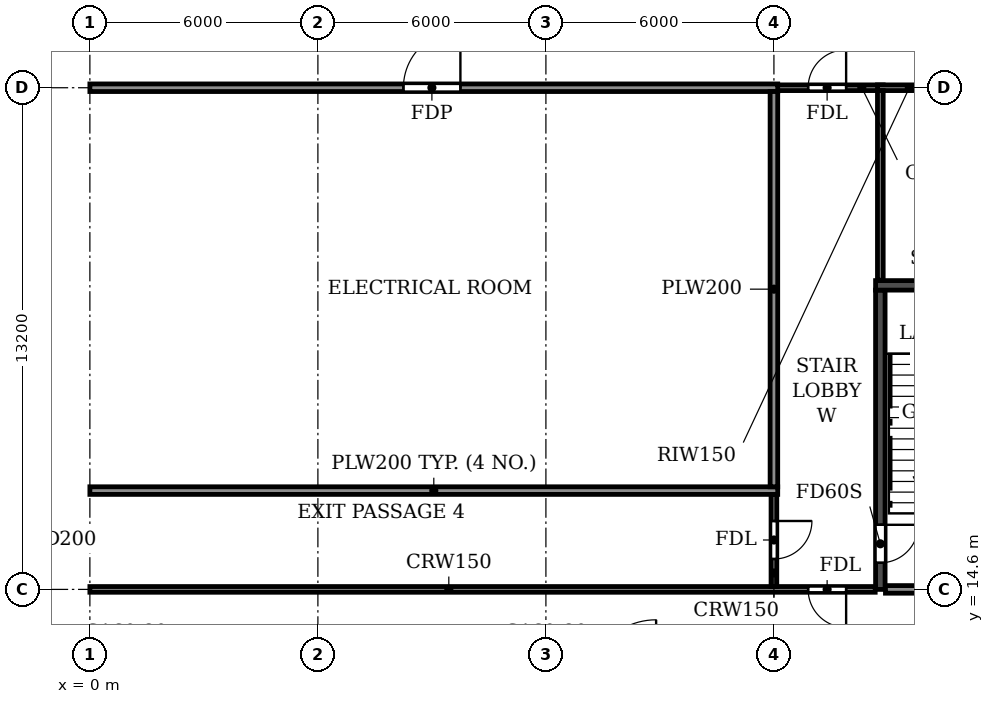
"""IFC4 building model, lengths in metres.
Left out: names, types, materials, properties, quantities, classifications, styles, units other than length and angle.
Written with IfcOpenShell. Run it as: python <this file> out.ifc"""

import sys

from ifc_helpers import new_model, si_unit, direction, frame, frame_2d, origin, place, context, subcontext, project, spatial, rectangle, extrude, element, fill, save


model = new_model("IFC4")
c1 = context("Model", 3, precision=1e-05, world=origin(), true_north=direction((0.0, 1.0)))
c2 = subcontext(c1, "Body", "Model", "MODEL_VIEW")
j1 = project(units=[si_unit("LENGTHUNIT", "METRE"), si_unit("PLANEANGLEUNIT", "RADIAN")], contexts=[c1])
p1 = place(None, origin())
s1 = spatial("IfcSite", under=j1, at=p1, CompositionType="ELEMENT")
p2 = place(p1, origin())
s2 = spatial("IfcBuilding", under=s1, at=p2, CompositionType="ELEMENT")
p3 = place(p2, origin())
s3 = spatial("IfcBuildingStorey", under=s2, at=p3, CompositionType="ELEMENT", Elevation=0.0)
p4 = place(p3, frame((20.8, 14.6, 0.0), z_axis=(0.0, 0.0, 1.0), x_axis=(0.0, 1.0, 0.0)))
e1 = element("IfcWall", 1, at=p4, inside=s3, PredefinedType="SOLIDWALL", context=c2, shape_type="SweptSolid", body=[
    extrude(rectangle(XDim=7.875, YDim=0.25, at=frame_2d((3.938, 0.0))), origin(), (0.0, 0.0, 1.0), 4.2),
])
p5 = place(p4, frame((0.7, 0.0, 0.0)))
e2 = element("IfcOpeningElement", 2, at=p5, cuts=e1, PredefinedType="OPENING", context=c2, shape_type="SweptSolid", body=[
    extrude(rectangle(XDim=1.0, YDim=2.1, at=frame_2d((0.5, 1.05))), frame((0.0, 0.135, 0.0), z_axis=(0.0, -1.0, 0.0), x_axis=(1.0, 0.0, 0.0)), (0.0, 0.0, 1.0), 0.27),
])
p6 = place(p3, frame((20.675, 22.6, 0.0), z_axis=(0.0, 0.0, 1.0), x_axis=(1.0, 0.0, 0.0)))
e3 = element("IfcWall", 3, at=p6, inside=s3, PredefinedType="SOLIDWALL", context=c2, shape_type="SweptSolid", body=[
    extrude(rectangle(XDim=4.05, YDim=0.25, at=frame_2d((2.025, 0.0))), origin(), (0.0, 0.0, 1.0), 4.2),
])
p7 = place(p3, frame((0.0, 14.6, 0.0), z_axis=(0.0, 0.0, 1.0), x_axis=(1.0, 0.0, 0.0)))
e4 = element("IfcWall", 4, at=p7, inside=s3, PredefinedType="PARTITIONING", context=c2, shape_type="SweptSolid", body=[
    extrude(rectangle(XDim=20.665, YDim=0.15, at=frame_2d((10.333, 0.0))), origin(), (0.0, 0.0, 1.0), 4.2),
])
p8 = place(p7, frame((18.9, 0.0, 0.0)))
e5 = element("IfcOpeningElement", 5, at=p8, cuts=e4, PredefinedType="OPENING", context=c2, shape_type="SweptSolid", body=[
    extrude(rectangle(XDim=1.0, YDim=2.1, at=frame_2d((0.5, 1.05))), frame((0.0, 0.085, 0.0), z_axis=(0.0, -1.0, 0.0), x_axis=(1.0, 0.0, 0.0)), (0.0, 0.0, 1.0), 0.17),
])
p9 = place(p3, frame((17.9, 27.8, 0.0), z_axis=(0.0, 0.0, 1.0), x_axis=(1.0, 0.0, 0.0)))
e6 = element("IfcWall", 6, at=p9, inside=s3, PredefinedType="PARTITIONING", context=c2, shape_type="SweptSolid", body=[
    extrude(rectangle(XDim=2.975, YDim=0.15, at=frame_2d((1.488, 0.0))), origin(), (0.0, 0.0, 1.0), 4.2),
])
p10 = place(p9, frame((1.0, 0.0, 0.0)))
e7 = element("IfcOpeningElement", 7, at=p10, cuts=e6, PredefinedType="OPENING", context=c2, shape_type="SweptSolid", body=[
    extrude(rectangle(XDim=1.0, YDim=2.1, at=frame_2d((0.5, 1.05))), frame((0.0, 0.085, 0.0), z_axis=(0.0, -1.0, 0.0), x_axis=(1.0, 0.0, 0.0)), (0.0, 0.0, 1.0), 0.17),
])
p11 = place(p3, frame((18.0, 14.675, 0.0), z_axis=(0.0, 0.0, 1.0), x_axis=(0.0, 1.0, 0.0)))
e8 = element("IfcWall", 8, at=p11, inside=s3, PredefinedType="PARTITIONING", context=c2, shape_type="SweptSolid", body=[
    extrude(rectangle(XDim=2.425, YDim=0.15, at=frame_2d((1.212, 0.0))), origin(), (0.0, 0.0, 1.0), 4.2),
])
p12 = place(p11, frame((0.725, 0.0, 0.0)))
e9 = element("IfcOpeningElement", 9, at=p12, cuts=e8, PredefinedType="OPENING", context=c2, shape_type="SweptSolid", body=[
    extrude(rectangle(XDim=1.0, YDim=2.1, at=frame_2d((0.5, 1.05))), frame((0.0, 0.085, 0.0), z_axis=(0.0, -1.0, 0.0), x_axis=(1.0, 0.0, 0.0)), (0.0, 0.0, 1.0), 0.17),
])
p13 = place(p3, frame((0.0, 17.2, 0.0), z_axis=(0.0, 0.0, 1.0), x_axis=(1.0, 0.0, 0.0)))
e10 = element("IfcWall", 10, at=p13, inside=s3, PredefinedType="PARTITIONING", context=c2, shape_type="SweptSolid", body=[
    extrude(rectangle(XDim=18.1, YDim=0.2, at=frame_2d((9.05, 0.0))), origin(), (0.0, 0.0, 1.0), 4.2),
])
p14 = place(p3, frame((0.0, 27.8, 0.0), z_axis=(0.0, 0.0, 1.0), x_axis=(1.0, 0.0, 0.0)))
e11 = element("IfcWall", 11, at=p14, inside=s3, PredefinedType="PARTITIONING", context=c2, shape_type="SweptSolid", body=[
    extrude(rectangle(XDim=18.1, YDim=0.2, at=frame_2d((9.05, 0.0))), origin(), (0.0, 0.0, 1.0), 4.2),
])
p15 = place(p14, frame((8.25, 0.0, 0.0)))
e12 = element("IfcOpeningElement", 12, at=p15, cuts=e11, PredefinedType="OPENING", context=c2, shape_type="SweptSolid", body=[
    extrude(rectangle(XDim=1.5, YDim=2.1, at=frame_2d((0.75, 1.05))), frame((0.0, 0.11, 0.0), z_axis=(0.0, -1.0, 0.0), x_axis=(1.0, 0.0, 0.0)), (0.0, 0.0, 1.0), 0.22),
])
p16 = place(p3, frame((18.0, 17.3, 0.0), z_axis=(0.0, 0.0, 1.0), x_axis=(0.0, 1.0, 0.0)))
e13 = element("IfcWall", 13, at=p16, inside=s3, PredefinedType="PARTITIONING", context=c2, shape_type="SweptSolid", body=[
    extrude(rectangle(XDim=10.4, YDim=0.2, at=frame_2d((5.2, 0.0))), origin(), (0.0, 0.0, 1.0), 4.2),
])
p17 = place(p3, frame((20.725, 27.8, 0.0), z_axis=(0.0, 0.0, 1.0), x_axis=(1.0, 0.0, 0.0)))
e14 = element("IfcWall", 14, at=p17, inside=s3, PredefinedType="PARTITIONING", context=c2, shape_type="SweptSolid", body=[
    extrude(rectangle(XDim=3.95, YDim=0.15, at=frame_2d((1.975, 0.0))), origin(), (0.0, 0.0, 1.0), 4.2),
])
p18 = place(p17, frame((1.525, 0.0, 0.0)))
e15 = element("IfcOpeningElement", 15, at=p18, cuts=e14, PredefinedType="OPENING", context=c2, shape_type="SweptSolid", body=[
    extrude(rectangle(XDim=0.9, YDim=2.1, at=frame_2d((0.45, 1.05))), frame((0.0, 0.085, 0.0), z_axis=(0.0, -1.0, 0.0), x_axis=(1.0, 0.0, 0.0)), (0.0, 0.0, 1.0), 0.17),
])
p19 = place(p3, frame((20.8, 22.735, 0.0), z_axis=(0.0, 0.0, 1.0), x_axis=(0.0, 1.0, 0.0)))
e16 = element("IfcWall", 16, at=p19, inside=s3, PredefinedType="PARTITIONING", context=c2, shape_type="SweptSolid", body=[
    extrude(rectangle(XDim=4.99, YDim=0.15, at=frame_2d((2.495, 0.0))), origin(), (0.0, 0.0, 1.0), 4.2),
])
p20 = place(p3, frame((20.935, 14.6, 0.0), z_axis=(0.0, 0.0, 1.0), x_axis=(1.0, 0.0, 0.0)))
e17 = element("IfcWall", 17, at=p20, inside=s3, PredefinedType="PARTITIONING", context=c2, shape_type="SweptSolid", body=[
    extrude(rectangle(XDim=3.53, YDim=0.2, at=frame_2d((1.765, 0.0))), origin(), (0.0, 0.0, 1.0), 4.2),
])
p21 = place(p15, origin())
e18 = element("IfcDoor", 18, at=p21, inside=s3, OperationType="DOUBLE_DOOR_SINGLE_SWING", PredefinedType="DOOR", context=c2, shape_type="SweptSolid", body=[
    extrude(rectangle(XDim=1.5, YDim=2.1, at=frame_2d((0.75, 1.05))), frame((0.0, 0.025, 0.0), z_axis=(0.0, -1.0, 0.0), x_axis=(1.0, 0.0, 0.0)), (0.0, 0.0, 1.0), 0.05),
])
fill(e12, e18)
p22 = place(p10, origin())
e19 = element("IfcDoor", 19, at=p22, inside=s3, OperationType="SINGLE_SWING_RIGHT", PredefinedType="DOOR", context=c2, shape_type="SweptSolid", body=[
    extrude(rectangle(XDim=1.0, YDim=2.1, at=frame_2d((0.5, 1.05))), frame((0.0, 0.025, 0.0), z_axis=(0.0, -1.0, 0.0), x_axis=(1.0, 0.0, 0.0)), (0.0, 0.0, 1.0), 0.05),
])
fill(e7, e19)
p23 = place(p8, frame((1.0, 0.0, 0.0), z_axis=(0.0, 0.0, 1.0), x_axis=(-1.0, 0.0, 0.0)))
e20 = element("IfcDoor", 20, at=p23, inside=s3, OperationType="SINGLE_SWING_LEFT", PredefinedType="DOOR", context=c2, shape_type="SweptSolid", body=[
    extrude(rectangle(XDim=1.0, YDim=2.1, at=frame_2d((0.5, 1.05))), frame((0.0, 0.025, 0.0), z_axis=(0.0, -1.0, 0.0), x_axis=(1.0, 0.0, 0.0)), (0.0, 0.0, 1.0), 0.05),
])
fill(e5, e20)
p24 = place(p12, frame((1.0, 0.0, 0.0), z_axis=(0.0, 0.0, 1.0), x_axis=(-1.0, 0.0, 0.0)))
e21 = element("IfcDoor", 21, at=p24, inside=s3, OperationType="SINGLE_SWING_LEFT", PredefinedType="DOOR", context=c2, shape_type="SweptSolid", body=[
    extrude(rectangle(XDim=1.0, YDim=2.1, at=frame_2d((0.5, 1.05))), frame((0.0, 0.025, 0.0), z_axis=(0.0, -1.0, 0.0), x_axis=(1.0, 0.0, 0.0)), (0.0, 0.0, 1.0), 0.05),
])
fill(e9, e21)
p25 = place(p5, frame((1.0, 0.0, 0.0), z_axis=(0.0, 0.0, 1.0), x_axis=(-1.0, 0.0, 0.0)))
e22 = element("IfcDoor", 22, at=p25, inside=s3, OperationType="SINGLE_SWING_LEFT", PredefinedType="DOOR", context=c2, shape_type="SweptSolid", body=[
    extrude(rectangle(XDim=1.0, YDim=2.1, at=frame_2d((0.5, 1.05))), frame((0.0, 0.025, 0.0), z_axis=(0.0, -1.0, 0.0), x_axis=(1.0, 0.0, 0.0)), (0.0, 0.0, 1.0), 0.05),
])
fill(e2, e22)
save(model, sys.argv[1])
